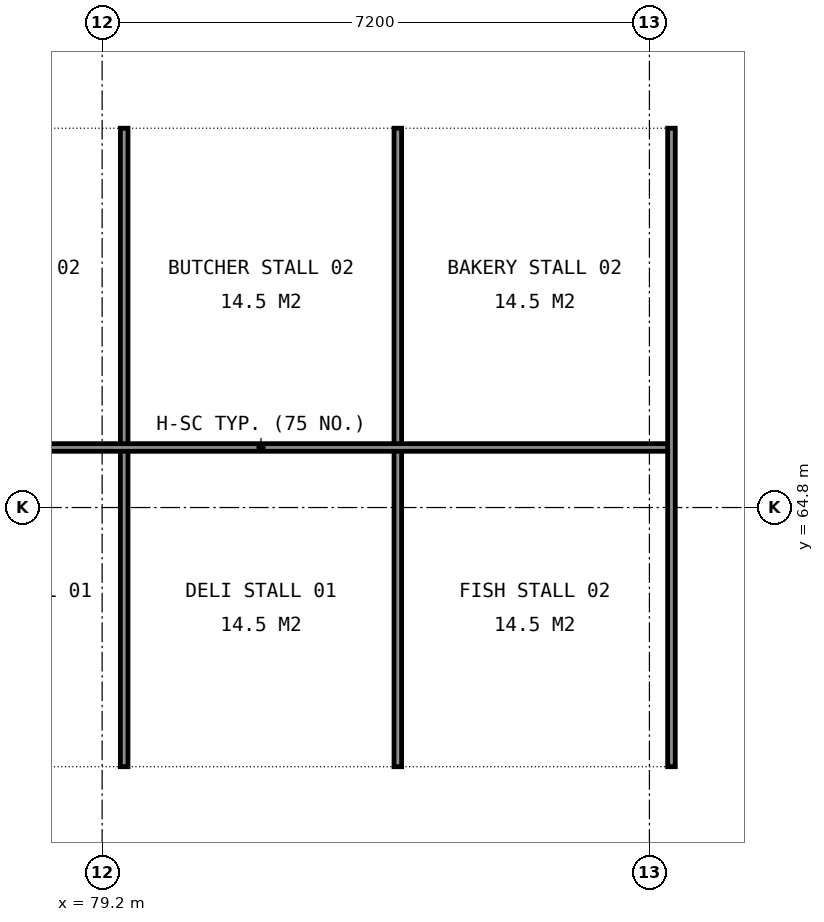
"""IFC4 building model, lengths in metres.
Left out: names, types, materials, properties, quantities, classifications, styles, units other than length and angle.
Written with IfcOpenShell. Run it as: python <this file> out.ifc"""

import sys

from ifc_helpers import new_model, si_unit, direction, frame, frame_2d, origin, place, context, subcontext, project, spatial, rectangle, extrude, element, save


model = new_model("IFC4")
c1 = context("Model", 3, precision=1e-05, world=origin(), true_north=direction((0.0, 1.0)))
c2 = subcontext(c1, "Body", "Model", "MODEL_VIEW")
j1 = project(units=[si_unit("LENGTHUNIT", "METRE"), si_unit("PLANEANGLEUNIT", "RADIAN")], contexts=[c1])
p1 = place(None, origin())
s1 = spatial("IfcSite", under=j1, at=p1, CompositionType="ELEMENT")
p2 = place(p1, origin())
s2 = spatial("IfcBuilding", under=s1, at=p2, CompositionType="ELEMENT")
p3 = place(p2, origin())
s3 = spatial("IfcBuildingStorey", under=s2, at=p3, CompositionType="ELEMENT", Elevation=0.0)
for number, where, z_axis, x_axis in (
    (1, (79.49, 61.39, 0.0), (0.0, 0.0, 1.0), (0.0, 1.0, 0.0)),
    (2, (83.09, 61.39, 0.0), (0.0, 0.0, 1.0), (0.0, 1.0, 0.0)),
    (3, (86.69, 61.39, 0.0), (0.0, 0.0, 1.0), (0.0, 1.0, 0.0)),
):
    element("IfcWall", number, at=place(p3, frame(where, z_axis=z_axis, x_axis=x_axis)), inside=s3, PredefinedType="PARTITIONING", context=c2, shape_type="SweptSolid", body=[
        extrude(rectangle(XDim=8.4, YDim=0.1, at=frame_2d((4.2, 0.0))), origin(), (0.0, 0.0, 1.0), 1.2),
    ])
p4 = place(p3, frame((75.94, 65.59, 0.0), z_axis=(0.0, 0.0, 1.0), x_axis=(1.0, 0.0, 0.0)))
e4 = element("IfcWall", 4, at=p4, inside=s3, PredefinedType="PARTITIONING", context=c2, shape_type="SweptSolid", body=[
    extrude(rectangle(XDim=10.7, YDim=0.1, at=frame_2d((5.35, 0.0))), origin(), (0.0, 0.0, 1.0), 1.2),
])
save(model, sys.argv[1])
